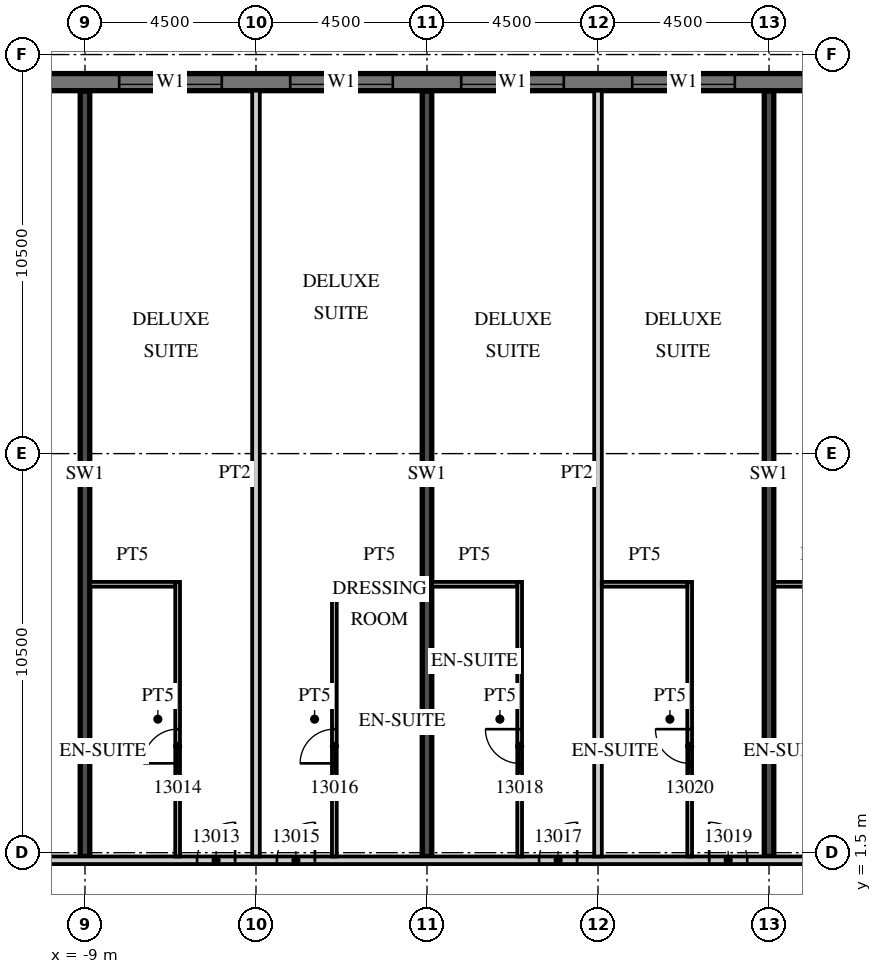
"""IFC4 building model, lengths in metres.
Left out: names, types, materials, properties, quantities, classifications, styles, units other than length and angle.
Written with IfcOpenShell. Run it as: python <this file> out.ifc"""

import sys

from ifc_helpers import new_model, si_unit, direction, frame, frame_2d, origin, place, context, subcontext, project, spatial, rectangle, extrude, element, fill, save


model = new_model("IFC4")
c1 = context("Model", 3, precision=1e-05, world=origin(), true_north=direction((0.0, 1.0)))
c2 = subcontext(c1, "Body", "Model", "MODEL_VIEW")
j1 = project(units=[si_unit("LENGTHUNIT", "METRE"), si_unit("PLANEANGLEUNIT", "RADIAN")], contexts=[c1])
p1 = place(None, origin())
s1 = spatial("IfcSite", under=j1, at=p1, CompositionType="ELEMENT")
p2 = place(p1, origin())
s2 = spatial("IfcBuilding", under=s1, at=p2, CompositionType="ELEMENT")
p3 = place(p2, frame((0.0, 0.0, 73.2)))
s3 = spatial("IfcBuildingStorey", under=s2, at=p3, CompositionType="ELEMENT", Elevation=73.2)
for number, where, z_axis, x_axis in (
    (1, (-9.0, 1.4, 0.0), (0.0, 0.0, 1.0), (0.0, 1.0, 0.0)),
    (2, (0.0, 1.4, 0.0), (0.0, 0.0, 1.0), (0.0, 1.0, 0.0)),
    (3, (9.0, 1.4, 0.0), (0.0, 0.0, 1.0), (0.0, 1.0, 0.0)),
):
    element("IfcWall", number, at=place(p3, frame(where, z_axis=z_axis, x_axis=x_axis)), inside=s3, PredefinedType="SHEAR", context=c2, shape_type="SweptSolid", body=[
        extrude(rectangle(XDim=20.14, YDim=0.25, at=frame_2d((10.07, 0.0))), origin(), (0.0, 0.0, 1.0), 3.3),
    ])
p4 = place(p3, frame((13.5, 21.775, 0.0), z_axis=(0.0, 0.0, 1.0), x_axis=(-1.0, 0.0, 0.0)))
e4 = element("IfcWall", 4, at=p4, inside=s3, PredefinedType="SOLIDWALL", context=c2, shape_type="SweptSolid", body=[
    extrude(rectangle(XDim=54.5, YDim=0.45, at=frame_2d((27.25, 0.0))), origin(), (0.0, 0.0, 1.0), 3.02),
])
p5 = place(p4, frame((0.9, 0.0, 0.45)))
e5 = element("IfcOpeningElement", 5, at=p5, cuts=e4, PredefinedType="OPENING", context=c2, shape_type="SweptSolid", body=[
    extrude(rectangle(XDim=2.7, YDim=2.25, at=frame_2d((1.35, 1.125))), frame((0.0, 0.235, 0.0), z_axis=(0.0, -1.0, 0.0), x_axis=(1.0, 0.0, 0.0)), (0.0, 0.0, 1.0), 0.47),
])
p6 = place(p4, frame((5.4, 0.0, 0.45)))
e6 = element("IfcOpeningElement", 6, at=p6, cuts=e4, PredefinedType="OPENING", context=c2, shape_type="SweptSolid", body=[
    extrude(rectangle(XDim=2.7, YDim=2.25, at=frame_2d((1.35, 1.125))), frame((0.0, 0.235, 0.0), z_axis=(0.0, -1.0, 0.0), x_axis=(1.0, 0.0, 0.0)), (0.0, 0.0, 1.0), 0.47),
])
p7 = place(p4, frame((9.9, 0.0, 0.45)))
e7 = element("IfcOpeningElement", 7, at=p7, cuts=e4, PredefinedType="OPENING", context=c2, shape_type="SweptSolid", body=[
    extrude(rectangle(XDim=2.7, YDim=2.25, at=frame_2d((1.35, 1.125))), frame((0.0, 0.235, 0.0), z_axis=(0.0, -1.0, 0.0), x_axis=(1.0, 0.0, 0.0)), (0.0, 0.0, 1.0), 0.47),
])
p8 = place(p4, frame((14.4, 0.0, 0.45)))
e8 = element("IfcOpeningElement", 8, at=p8, cuts=e4, PredefinedType="OPENING", context=c2, shape_type="SweptSolid", body=[
    extrude(rectangle(XDim=2.7, YDim=2.25, at=frame_2d((1.35, 1.125))), frame((0.0, 0.235, 0.0), z_axis=(0.0, -1.0, 0.0), x_axis=(1.0, 0.0, 0.0)), (0.0, 0.0, 1.0), 0.47),
])
p9 = place(p4, frame((18.9, 0.0, 0.45)))
e9 = element("IfcOpeningElement", 9, at=p9, cuts=e4, PredefinedType="OPENING", context=c2, shape_type="SweptSolid", body=[
    extrude(rectangle(XDim=2.7, YDim=2.25, at=frame_2d((1.35, 1.125))), frame((0.0, 0.235, 0.0), z_axis=(0.0, -1.0, 0.0), x_axis=(1.0, 0.0, 0.0)), (0.0, 0.0, 1.0), 0.47),
])
p10 = place(p4, frame((23.4, 0.0, 0.45)))
e10 = element("IfcOpeningElement", 10, at=p10, cuts=e4, PredefinedType="OPENING", context=c2, shape_type="SweptSolid", body=[
    extrude(rectangle(XDim=2.7, YDim=2.25, at=frame_2d((1.35, 1.125))), frame((0.0, 0.235, 0.0), z_axis=(0.0, -1.0, 0.0), x_axis=(1.0, 0.0, 0.0)), (0.0, 0.0, 1.0), 0.47),
])
p11 = place(p4, frame((27.9, 0.0, 0.45)))
e11 = element("IfcOpeningElement", 11, at=p11, cuts=e4, PredefinedType="OPENING", context=c2, shape_type="SweptSolid", body=[
    extrude(rectangle(XDim=2.7, YDim=2.25, at=frame_2d((1.35, 1.125))), frame((0.0, 0.235, 0.0), z_axis=(0.0, -1.0, 0.0), x_axis=(1.0, 0.0, 0.0)), (0.0, 0.0, 1.0), 0.47),
])
p12 = place(p4, frame((32.4, 0.0, 0.45)))
e12 = element("IfcOpeningElement", 12, at=p12, cuts=e4, PredefinedType="OPENING", context=c2, shape_type="SweptSolid", body=[
    extrude(rectangle(XDim=2.7, YDim=2.25, at=frame_2d((1.35, 1.125))), frame((0.0, 0.235, 0.0), z_axis=(0.0, -1.0, 0.0), x_axis=(1.0, 0.0, 0.0)), (0.0, 0.0, 1.0), 0.47),
])
p13 = place(p4, frame((36.9, 0.0, 0.45)))
e13 = element("IfcOpeningElement", 13, at=p13, cuts=e4, PredefinedType="OPENING", context=c2, shape_type="SweptSolid", body=[
    extrude(rectangle(XDim=2.7, YDim=2.25, at=frame_2d((1.35, 1.125))), frame((0.0, 0.235, 0.0), z_axis=(0.0, -1.0, 0.0), x_axis=(1.0, 0.0, 0.0)), (0.0, 0.0, 1.0), 0.47),
])
p14 = place(p4, frame((41.4, 0.0, 0.45)))
e14 = element("IfcOpeningElement", 14, at=p14, cuts=e4, PredefinedType="OPENING", context=c2, shape_type="SweptSolid", body=[
    extrude(rectangle(XDim=2.7, YDim=2.25, at=frame_2d((1.35, 1.125))), frame((0.0, 0.235, 0.0), z_axis=(0.0, -1.0, 0.0), x_axis=(1.0, 0.0, 0.0)), (0.0, 0.0, 1.0), 0.47),
])
p15 = place(p4, frame((45.9, 0.0, 0.45)))
e15 = element("IfcOpeningElement", 15, at=p15, cuts=e4, PredefinedType="OPENING", context=c2, shape_type="SweptSolid", body=[
    extrude(rectangle(XDim=2.7, YDim=2.25, at=frame_2d((1.35, 1.125))), frame((0.0, 0.235, 0.0), z_axis=(0.0, -1.0, 0.0), x_axis=(1.0, 0.0, 0.0)), (0.0, 0.0, 1.0), 0.47),
])
p16 = place(p4, frame((50.4, 0.0, 0.45)))
e16 = element("IfcOpeningElement", 16, at=p16, cuts=e4, PredefinedType="OPENING", context=c2, shape_type="SweptSolid", body=[
    extrude(rectangle(XDim=2.7, YDim=2.25, at=frame_2d((1.35, 1.125))), frame((0.0, 0.235, 0.0), z_axis=(0.0, -1.0, 0.0), x_axis=(1.0, 0.0, 0.0)), (0.0, 0.0, 1.0), 0.47),
])
p17 = place(p3, frame((-44.55, 1.3, 0.0), z_axis=(0.0, 0.0, 1.0), x_axis=(1.0, 0.0, 0.0)))
e17 = element("IfcWall", 17, at=p17, inside=s3, PredefinedType="PARTITIONING", context=c2, shape_type="SweptSolid", body=[
    extrude(rectangle(XDim=58.05, YDim=0.2, at=frame_2d((29.025, 0.0))), origin(), (0.0, 0.0, 1.0), 3.02),
])
p18 = place(p17, frame((0.525, 0.0, 0.0)))
e18 = element("IfcOpeningElement", 18, at=p18, cuts=e17, PredefinedType="OPENING", context=c2, shape_type="SweptSolid", body=[
    extrude(rectangle(XDim=1.0, YDim=2.1, at=frame_2d((0.5, 1.05))), frame((0.0, 0.11, 0.0), z_axis=(0.0, -1.0, 0.0), x_axis=(1.0, 0.0, 0.0)), (0.0, 0.0, 1.0), 0.22),
])
p19 = place(p17, frame((6.975, 0.0, 0.0)))
e19 = element("IfcOpeningElement", 19, at=p19, cuts=e17, PredefinedType="OPENING", context=c2, shape_type="SweptSolid", body=[
    extrude(rectangle(XDim=1.0, YDim=2.1, at=frame_2d((0.5, 1.05))), frame((0.0, 0.11, 0.0), z_axis=(0.0, -1.0, 0.0), x_axis=(1.0, 0.0, 0.0)), (0.0, 0.0, 1.0), 0.22),
])
p20 = place(p17, frame((9.125, 0.0, 0.0)))
e20 = element("IfcOpeningElement", 20, at=p20, cuts=e17, PredefinedType="OPENING", context=c2, shape_type="SweptSolid", body=[
    extrude(rectangle(XDim=1.0, YDim=2.1, at=frame_2d((0.5, 1.05))), frame((0.0, 0.11, 0.0), z_axis=(0.0, -1.0, 0.0), x_axis=(1.0, 0.0, 0.0)), (0.0, 0.0, 1.0), 0.22),
])
p21 = place(p17, frame((13.6, 0.0, 0.0)))
e21 = element("IfcOpeningElement", 21, at=p21, cuts=e17, PredefinedType="OPENING", context=c2, shape_type="SweptSolid", body=[
    extrude(rectangle(XDim=1.0, YDim=2.1, at=frame_2d((0.5, 1.05))), frame((0.0, 0.11, 0.0), z_axis=(0.0, -1.0, 0.0), x_axis=(1.0, 0.0, 0.0)), (0.0, 0.0, 1.0), 0.22),
])
p22 = place(p17, frame((19.987, 0.0, 0.0)))
e22 = element("IfcOpeningElement", 22, at=p22, cuts=e17, PredefinedType="OPENING", context=c2, shape_type="SweptSolid", body=[
    extrude(rectangle(XDim=1.2, YDim=2.1, at=frame_2d((0.6, 1.05))), frame((0.0, 0.11, 0.0), z_axis=(0.0, -1.0, 0.0), x_axis=(1.0, 0.0, 0.0)), (0.0, 0.0, 1.0), 0.22),
])
p23 = place(p17, frame((31.912, 0.0, 0.0)))
e23 = element("IfcOpeningElement", 23, at=p23, cuts=e17, PredefinedType="OPENING", context=c2, shape_type="SweptSolid", body=[
    extrude(rectangle(XDim=1.2, YDim=2.1, at=frame_2d((0.6, 1.05))), frame((0.0, 0.11, 0.0), z_axis=(0.0, -1.0, 0.0), x_axis=(1.0, 0.0, 0.0)), (0.0, 0.0, 1.0), 0.22),
])
p24 = place(p17, frame((38.5, 0.0, 0.0)))
e24 = element("IfcOpeningElement", 24, at=p24, cuts=e17, PredefinedType="OPENING", context=c2, shape_type="SweptSolid", body=[
    extrude(rectangle(XDim=1.0, YDim=2.1, at=frame_2d((0.5, 1.05))), frame((0.0, 0.11, 0.0), z_axis=(0.0, -1.0, 0.0), x_axis=(1.0, 0.0, 0.0)), (0.0, 0.0, 1.0), 0.22),
])
p25 = place(p17, frame((40.6, 0.0, 0.0)))
e25 = element("IfcOpeningElement", 25, at=p25, cuts=e17, PredefinedType="OPENING", context=c2, shape_type="SweptSolid", body=[
    extrude(rectangle(XDim=1.0, YDim=2.1, at=frame_2d((0.5, 1.05))), frame((0.0, 0.11, 0.0), z_axis=(0.0, -1.0, 0.0), x_axis=(1.0, 0.0, 0.0)), (0.0, 0.0, 1.0), 0.22),
])
p26 = place(p17, frame((47.5, 0.0, 0.0)))
e26 = element("IfcOpeningElement", 26, at=p26, cuts=e17, PredefinedType="OPENING", context=c2, shape_type="SweptSolid", body=[
    extrude(rectangle(XDim=1.0, YDim=2.1, at=frame_2d((0.5, 1.05))), frame((0.0, 0.11, 0.0), z_axis=(0.0, -1.0, 0.0), x_axis=(1.0, 0.0, 0.0)), (0.0, 0.0, 1.0), 0.22),
])
p27 = place(p17, frame((51.975, 0.0, 0.0)))
e27 = element("IfcOpeningElement", 27, at=p27, cuts=e17, PredefinedType="OPENING", context=c2, shape_type="SweptSolid", body=[
    extrude(rectangle(XDim=1.0, YDim=2.1, at=frame_2d((0.5, 1.05))), frame((0.0, 0.11, 0.0), z_axis=(0.0, -1.0, 0.0), x_axis=(1.0, 0.0, 0.0)), (0.0, 0.0, 1.0), 0.22),
])
p28 = place(p17, frame((56.475, 0.0, 0.0)))
e28 = element("IfcOpeningElement", 28, at=p28, cuts=e17, PredefinedType="OPENING", context=c2, shape_type="SweptSolid", body=[
    extrude(rectangle(XDim=1.0, YDim=2.1, at=frame_2d((0.5, 1.05))), frame((0.0, 0.11, 0.0), z_axis=(0.0, -1.0, 0.0), x_axis=(1.0, 0.0, 0.0)), (0.0, 0.0, 1.0), 0.22),
])
p29 = place(p3, frame((-4.5, 1.4, 0.0), z_axis=(0.0, 0.0, 1.0), x_axis=(0.0, 1.0, 0.0)))
e29 = element("IfcWall", 29, at=p29, inside=s3, PredefinedType="PARTITIONING", context=c2, shape_type="SweptSolid", body=[
    extrude(rectangle(XDim=20.15, YDim=0.2, at=frame_2d((10.075, 0.0))), origin(), (0.0, 0.0, 1.0), 3.02),
])
p30 = place(p3, frame((-6.562, 1.4, 0.0), z_axis=(0.0, 0.0, 1.0), x_axis=(0.0, 1.0, 0.0)))
e30 = element("IfcWall", 30, at=p30, inside=s3, PredefinedType="PARTITIONING", context=c2, shape_type="SweptSolid", body=[
    extrude(rectangle(XDim=7.225, YDim=0.125, at=frame_2d((3.613, 0.0))), origin(), (0.0, 0.0, 1.0), 3.02),
])
p31 = place(p30, frame((2.45, 0.0, 0.0)))
e31 = element("IfcOpeningElement", 31, at=p31, cuts=e30, PredefinedType="OPENING", context=c2, shape_type="SweptSolid", body=[
    extrude(rectangle(XDim=0.9, YDim=2.1, at=frame_2d((0.45, 1.05))), frame((0.0, 0.073, 0.0), z_axis=(0.0, -1.0, 0.0), x_axis=(1.0, 0.0, 0.0)), (0.0, 0.0, 1.0), 0.145),
])
p32 = place(p3, frame((-8.875, 8.562, 0.0), z_axis=(0.0, 0.0, 1.0), x_axis=(1.0, 0.0, 0.0)))
e32 = element("IfcWall", 32, at=p32, inside=s3, PredefinedType="PARTITIONING", context=c2, shape_type="SweptSolid", body=[
    extrude(rectangle(XDim=2.25, YDim=0.125, at=frame_2d((1.125, 0.0))), origin(), (0.0, 0.0, 1.0), 3.02),
])
p33 = place(p3, frame((-2.438, 1.4, 0.0), z_axis=(0.0, 0.0, 1.0), x_axis=(0.0, 1.0, 0.0)))
e33 = element("IfcWall", 33, at=p33, inside=s3, PredefinedType="PARTITIONING", context=c2, shape_type="SweptSolid", body=[
    extrude(rectangle(XDim=7.225, YDim=0.125, at=frame_2d((3.613, 0.0))), origin(), (0.0, 0.0, 1.0), 3.02),
])
p34 = place(p33, frame((2.45, 0.0, 0.0)))
e34 = element("IfcOpeningElement", 34, at=p34, cuts=e33, PredefinedType="OPENING", context=c2, shape_type="SweptSolid", body=[
    extrude(rectangle(XDim=0.9, YDim=2.1, at=frame_2d((0.45, 1.05))), frame((0.0, 0.073, 0.0), z_axis=(0.0, -1.0, 0.0), x_axis=(1.0, 0.0, 0.0)), (0.0, 0.0, 1.0), 0.145),
])
p35 = place(p3, frame((-2.375, 8.562, 0.0), z_axis=(0.0, 0.0, 1.0), x_axis=(1.0, 0.0, 0.0)))
e35 = element("IfcWall", 35, at=p35, inside=s3, PredefinedType="PARTITIONING", context=c2, shape_type="SweptSolid", body=[
    extrude(rectangle(XDim=2.25, YDim=0.125, at=frame_2d((1.125, 0.0))), origin(), (0.0, 0.0, 1.0), 3.02),
])
p36 = place(p3, frame((4.5, 1.4, 0.0), z_axis=(0.0, 0.0, 1.0), x_axis=(0.0, 1.0, 0.0)))
e36 = element("IfcWall", 36, at=p36, inside=s3, PredefinedType="PARTITIONING", context=c2, shape_type="SweptSolid", body=[
    extrude(rectangle(XDim=20.15, YDim=0.2, at=frame_2d((10.075, 0.0))), origin(), (0.0, 0.0, 1.0), 3.02),
])
p37 = place(p3, frame((2.438, 1.4, 0.0), z_axis=(0.0, 0.0, 1.0), x_axis=(0.0, 1.0, 0.0)))
e37 = element("IfcWall", 37, at=p37, inside=s3, PredefinedType="PARTITIONING", context=c2, shape_type="SweptSolid", body=[
    extrude(rectangle(XDim=7.225, YDim=0.125, at=frame_2d((3.613, 0.0))), origin(), (0.0, 0.0, 1.0), 3.02),
])
p38 = place(p37, frame((2.45, 0.0, 0.0)))
e38 = element("IfcOpeningElement", 38, at=p38, cuts=e37, PredefinedType="OPENING", context=c2, shape_type="SweptSolid", body=[
    extrude(rectangle(XDim=0.9, YDim=2.1, at=frame_2d((0.45, 1.05))), frame((0.0, 0.073, 0.0), z_axis=(0.0, -1.0, 0.0), x_axis=(1.0, 0.0, 0.0)), (0.0, 0.0, 1.0), 0.145),
])
p39 = place(p3, frame((0.125, 8.562, 0.0), z_axis=(0.0, 0.0, 1.0), x_axis=(1.0, 0.0, 0.0)))
e39 = element("IfcWall", 39, at=p39, inside=s3, PredefinedType="PARTITIONING", context=c2, shape_type="SweptSolid", body=[
    extrude(rectangle(XDim=2.25, YDim=0.125, at=frame_2d((1.125, 0.0))), origin(), (0.0, 0.0, 1.0), 3.02),
])
p40 = place(p3, frame((6.912, 1.4, 0.0), z_axis=(0.0, 0.0, 1.0), x_axis=(0.0, 1.0, 0.0)))
e40 = element("IfcWall", 40, at=p40, inside=s3, PredefinedType="PARTITIONING", context=c2, shape_type="SweptSolid", body=[
    extrude(rectangle(XDim=7.225, YDim=0.125, at=frame_2d((3.613, 0.0))), origin(), (0.0, 0.0, 1.0), 3.02),
])
p41 = place(p40, frame((2.45, 0.0, 0.0)))
e41 = element("IfcOpeningElement", 41, at=p41, cuts=e40, PredefinedType="OPENING", context=c2, shape_type="SweptSolid", body=[
    extrude(rectangle(XDim=0.9, YDim=2.1, at=frame_2d((0.45, 1.05))), frame((0.0, 0.073, 0.0), z_axis=(0.0, -1.0, 0.0), x_axis=(1.0, 0.0, 0.0)), (0.0, 0.0, 1.0), 0.145),
])
for number, where, z_axis, x_axis in (
    (42, (4.6, 8.562, 0.0), (0.0, 0.0, 1.0), (1.0, 0.0, 0.0)),
    (43, (9.125, 8.562, 0.0), (0.0, 0.0, 1.0), (1.0, 0.0, 0.0)),
):
    element("IfcWall", number, at=place(p3, frame(where, z_axis=z_axis, x_axis=x_axis)), inside=s3, PredefinedType="PARTITIONING", context=c2, shape_type="SweptSolid", body=[
        extrude(rectangle(XDim=2.25, YDim=0.125, at=frame_2d((1.125, 0.0))), origin(), (0.0, 0.0, 1.0), 3.02),
    ])
p42 = place(p6, origin())
e44 = element("IfcWindow", 44, at=p42, inside=s3, PartitioningType="SINGLE_PANEL", PredefinedType="WINDOW", context=c2, shape_type="SweptSolid", body=[
    extrude(rectangle(XDim=2.7, YDim=2.25, at=frame_2d((1.35, 1.125))), frame((0.0, 0.09, 0.0), z_axis=(0.0, -1.0, 0.0), x_axis=(1.0, 0.0, 0.0)), (0.0, 0.0, 1.0), 0.06),
])
fill(e6, e44)
p43 = place(p7, origin())
e45 = element("IfcWindow", 45, at=p43, inside=s3, PartitioningType="SINGLE_PANEL", PredefinedType="WINDOW", context=c2, shape_type="SweptSolid", body=[
    extrude(rectangle(XDim=2.7, YDim=2.25, at=frame_2d((1.35, 1.125))), frame((0.0, 0.09, 0.0), z_axis=(0.0, -1.0, 0.0), x_axis=(1.0, 0.0, 0.0)), (0.0, 0.0, 1.0), 0.06),
])
fill(e7, e45)
p44 = place(p8, origin())
e46 = element("IfcWindow", 46, at=p44, inside=s3, PartitioningType="SINGLE_PANEL", PredefinedType="WINDOW", context=c2, shape_type="SweptSolid", body=[
    extrude(rectangle(XDim=2.7, YDim=2.25, at=frame_2d((1.35, 1.125))), frame((0.0, 0.09, 0.0), z_axis=(0.0, -1.0, 0.0), x_axis=(1.0, 0.0, 0.0)), (0.0, 0.0, 1.0), 0.06),
])
fill(e8, e46)
p45 = place(p9, origin())
e47 = element("IfcWindow", 47, at=p45, inside=s3, PartitioningType="SINGLE_PANEL", PredefinedType="WINDOW", context=c2, shape_type="SweptSolid", body=[
    extrude(rectangle(XDim=2.7, YDim=2.25, at=frame_2d((1.35, 1.125))), frame((0.0, 0.09, 0.0), z_axis=(0.0, -1.0, 0.0), x_axis=(1.0, 0.0, 0.0)), (0.0, 0.0, 1.0), 0.06),
])
fill(e9, e47)
p46 = place(p24, origin())
e48 = element("IfcDoor", 48, at=p46, inside=s3, OperationType="SINGLE_SWING_RIGHT", PredefinedType="DOOR", context=c2, shape_type="SweptSolid", body=[
    extrude(rectangle(XDim=1.0, YDim=2.1, at=frame_2d((0.5, 1.05))), frame((0.0, 0.025, 0.0), z_axis=(0.0, -1.0, 0.0), x_axis=(1.0, 0.0, 0.0)), (0.0, 0.0, 1.0), 0.05),
])
fill(e24, e48)
p47 = place(p31, origin())
e49 = element("IfcDoor", 49, at=p47, inside=s3, OperationType="SINGLE_SWING_LEFT", PredefinedType="DOOR", context=c2, shape_type="SweptSolid", body=[
    extrude(rectangle(XDim=0.9, YDim=2.1, at=frame_2d((0.45, 1.05))), frame((0.0, 0.025, 0.0), z_axis=(0.0, -1.0, 0.0), x_axis=(1.0, 0.0, 0.0)), (0.0, 0.0, 1.0), 0.05),
])
fill(e31, e49)
p48 = place(p25, origin())
e50 = element("IfcDoor", 50, at=p48, inside=s3, OperationType="SINGLE_SWING_RIGHT", PredefinedType="DOOR", context=c2, shape_type="SweptSolid", body=[
    extrude(rectangle(XDim=1.0, YDim=2.1, at=frame_2d((0.5, 1.05))), frame((0.0, 0.025, 0.0), z_axis=(0.0, -1.0, 0.0), x_axis=(1.0, 0.0, 0.0)), (0.0, 0.0, 1.0), 0.05),
])
fill(e25, e50)
p49 = place(p34, origin())
e51 = element("IfcDoor", 51, at=p49, inside=s3, OperationType="SINGLE_SWING_LEFT", PredefinedType="DOOR", context=c2, shape_type="SweptSolid", body=[
    extrude(rectangle(XDim=0.9, YDim=2.1, at=frame_2d((0.45, 1.05))), frame((0.0, 0.025, 0.0), z_axis=(0.0, -1.0, 0.0), x_axis=(1.0, 0.0, 0.0)), (0.0, 0.0, 1.0), 0.05),
])
fill(e34, e51)
p50 = place(p26, origin())
e52 = element("IfcDoor", 52, at=p50, inside=s3, OperationType="SINGLE_SWING_RIGHT", PredefinedType="DOOR", context=c2, shape_type="SweptSolid", body=[
    extrude(rectangle(XDim=1.0, YDim=2.1, at=frame_2d((0.5, 1.05))), frame((0.0, 0.025, 0.0), z_axis=(0.0, -1.0, 0.0), x_axis=(1.0, 0.0, 0.0)), (0.0, 0.0, 1.0), 0.05),
])
fill(e26, e52)
p51 = place(p38, origin())
e53 = element("IfcDoor", 53, at=p51, inside=s3, OperationType="SINGLE_SWING_RIGHT", PredefinedType="DOOR", context=c2, shape_type="SweptSolid", body=[
    extrude(rectangle(XDim=0.9, YDim=2.1, at=frame_2d((0.45, 1.05))), frame((0.0, 0.025, 0.0), z_axis=(0.0, -1.0, 0.0), x_axis=(1.0, 0.0, 0.0)), (0.0, 0.0, 1.0), 0.05),
])
fill(e38, e53)
p52 = place(p27, origin())
e54 = element("IfcDoor", 54, at=p52, inside=s3, OperationType="SINGLE_SWING_LEFT", PredefinedType="DOOR", context=c2, shape_type="SweptSolid", body=[
    extrude(rectangle(XDim=1.0, YDim=2.1, at=frame_2d((0.5, 1.05))), frame((0.0, 0.025, 0.0), z_axis=(0.0, -1.0, 0.0), x_axis=(1.0, 0.0, 0.0)), (0.0, 0.0, 1.0), 0.05),
])
fill(e27, e54)
p53 = place(p41, origin())
e55 = element("IfcDoor", 55, at=p53, inside=s3, OperationType="SINGLE_SWING_RIGHT", PredefinedType="DOOR", context=c2, shape_type="SweptSolid", body=[
    extrude(rectangle(XDim=0.9, YDim=2.1, at=frame_2d((0.45, 1.05))), frame((0.0, 0.025, 0.0), z_axis=(0.0, -1.0, 0.0), x_axis=(1.0, 0.0, 0.0)), (0.0, 0.0, 1.0), 0.05),
])
fill(e41, e55)
save(model, sys.argv[1])
